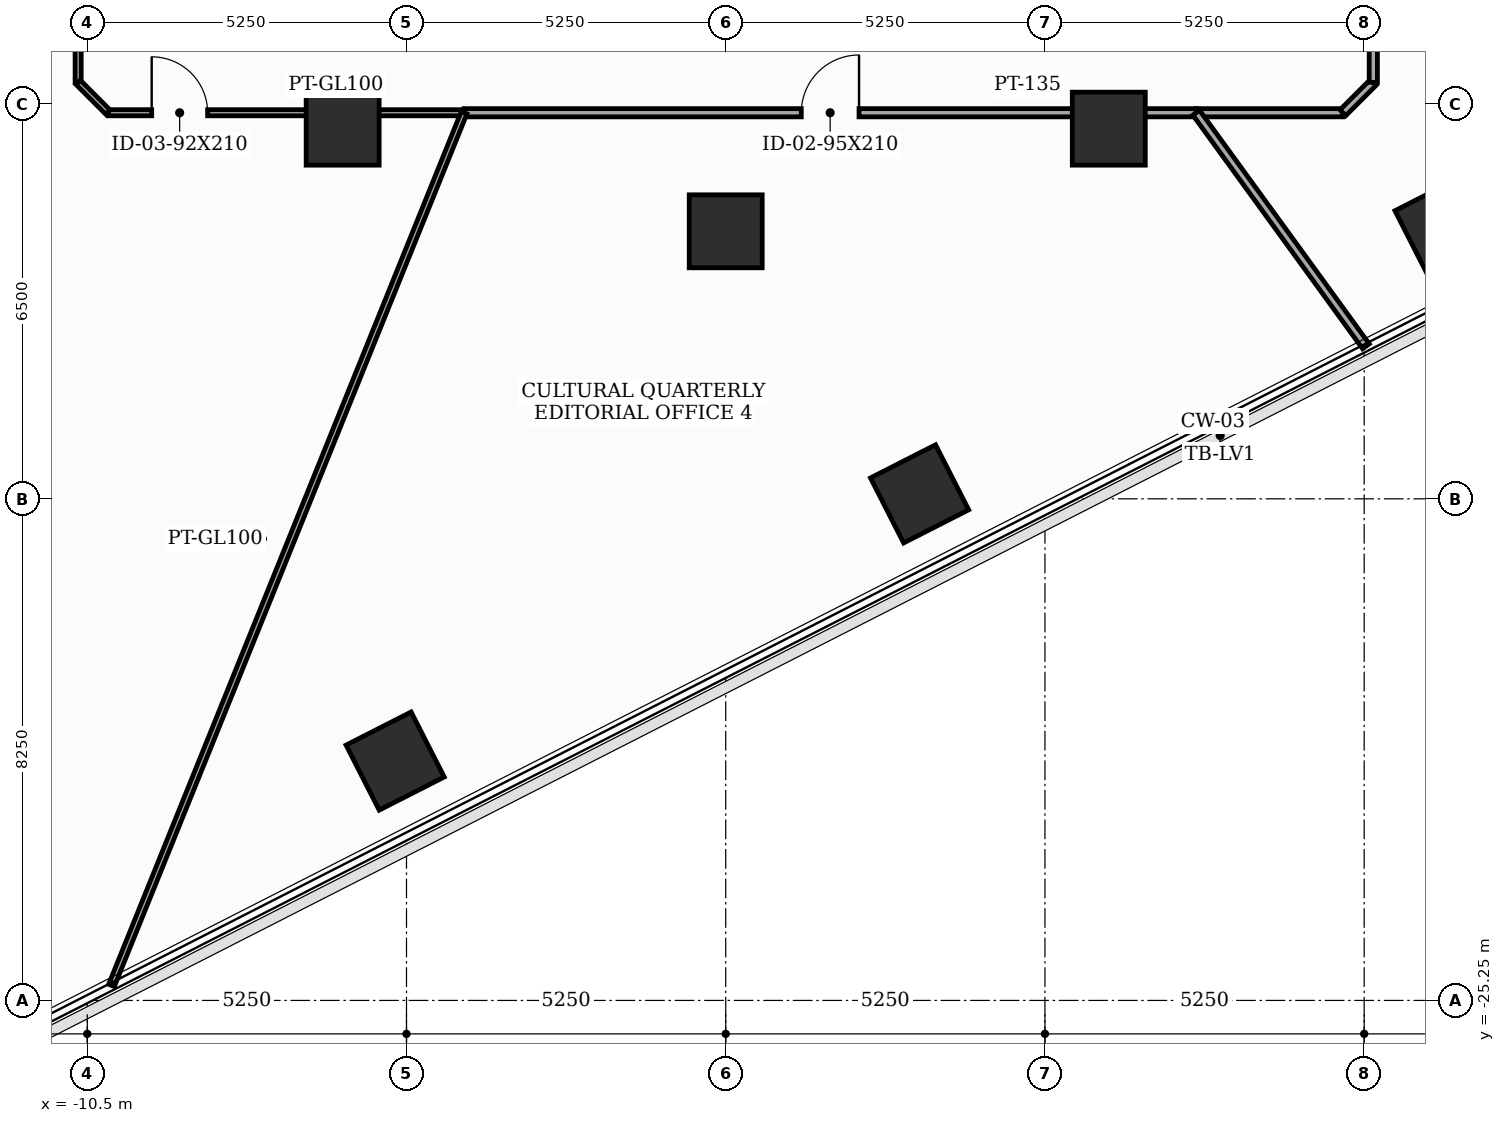
"""IFC4 building model, lengths in metres.
Left out: names, types, materials, properties, quantities, classifications, styles, units other than length and angle.
Written with IfcOpenShell. Run it as: python <this file> out.ifc"""

import sys

from ifc_helpers import new_model, si_unit, direction, frame, frame_2d, origin, origin_2d, place, context, subcontext, project, spatial, rectangle, extrude, element, fill, save


model = new_model("IFC4")
c1 = context("Model", 3, precision=1e-05, world=origin(), true_north=direction((0.0, 1.0)))
c2 = subcontext(c1, "Body", "Model", "MODEL_VIEW")
j1 = project(units=[si_unit("LENGTHUNIT", "METRE"), si_unit("PLANEANGLEUNIT", "RADIAN")], contexts=[c1])
p1 = place(None, origin())
s1 = spatial("IfcSite", under=j1, at=p1, CompositionType="ELEMENT")
p2 = place(p1, origin())
s2 = spatial("IfcBuilding", under=s1, at=p2, CompositionType="ELEMENT")
p3 = place(p2, frame((0.0, 0.0, 134.7)))
s3 = spatial("IfcBuildingStorey", under=s2, at=p3, CompositionType="ELEMENT", Elevation=134.7)
for number, where, z_axis, x_axis in (
    (1, (-6.3, -10.912, 0.0), (0.0, 0.0, 1.0), (1.0, 0.0, 0.0)),
    (2, (0.0, -12.6, 0.0), (0.0, 0.0, 1.0), (1.0, 0.0, 0.0)),
    (3, (6.3, -10.912, 0.0), (0.0, 0.0, 1.0), (1.0, 0.0, 0.0)),
    (4, (-5.437, -21.313, 0.0), (0.0, 0.0, 1.0), (0.891, 0.454, 0.0)),
    (5, (3.188, -16.918, 0.0), (0.0, 0.0, 1.0), (0.891, 0.454, 0.0)),
    (6, (11.813, -12.524, 0.0), (0.0, 0.0, 1.0), (0.891, 0.454, 0.0)),
):
    element("IfcColumn", number, at=place(p3, frame(where, z_axis=z_axis, x_axis=x_axis)), inside=s3, PredefinedType="COLUMN", context=c2, shape_type="SweptSolid", body=[
        extrude(rectangle(XDim=1.2, YDim=1.2, at=origin_2d()), origin(), (0.0, 0.0, 1.0), 3.7),
    ])
p4 = place(p3, frame((-10.65, -6.655, 0.0), z_axis=(0.0, 0.0, 1.0), x_axis=(0.0, -1.0, 0.0)))
e7 = element("IfcWall", 7, at=p4, inside=s3, PredefinedType="MOVABLE", context=c2, shape_type="SweptSolid", body=[
    extrude(rectangle(XDim=3.495, YDim=0.1, at=frame_2d((1.748, 0.0))), origin(), (0.0, 0.0, 1.0), 2.785),
])
p5 = place(p3, frame((-10.65, -10.15, 0.0), z_axis=(0.0, 0.0, 1.0), x_axis=(0.707106781187, -0.707106781187, 0.0)))
e8 = element("IfcWall", 8, at=p5, inside=s3, PredefinedType="MOVABLE", context=c2, shape_type="SweptSolid", body=[
    extrude(rectangle(XDim=0.707, YDim=0.1, at=frame_2d((0.354, 0.0))), origin(), (0.0, 0.0, 1.0), 3.5),
])
p6 = place(p3, frame((-10.15, -10.65, 0.0), z_axis=(0.0, 0.0, 1.0), x_axis=(1.0, 0.0, 0.0)))
e9 = element("IfcWall", 9, at=p6, inside=s3, PredefinedType="MOVABLE", context=c2, shape_type="SweptSolid", body=[
    extrude(rectangle(XDim=5.847, YDim=0.1, at=frame_2d((2.923, 0.0))), origin(), (0.0, 0.0, 1.0), 2.785),
])
p7 = place(p6, frame((0.709, 0.0, 0.0)))
e10 = element("IfcOpeningElement", 10, at=p7, cuts=e9, PredefinedType="OPENING", context=c2, shape_type="SweptSolid", body=[
    extrude(rectangle(XDim=0.92, YDim=2.1, at=frame_2d((0.46, 1.05))), frame((0.0, 0.06, 0.0), z_axis=(0.0, -1.0, 0.0), x_axis=(1.0, 0.0, 0.0)), (0.0, 0.0, 1.0), 0.12),
])
p8 = place(p3, frame((-4.303, -10.65, 0.0), z_axis=(0.0, 0.0, 1.0), x_axis=(1.0, 0.0, 0.0)))
e11 = element("IfcWall", 11, at=p8, inside=s3, PredefinedType="PARTITIONING", context=c2, shape_type="SweptSolid", body=[
    extrude(rectangle(XDim=12.041, YDim=0.135, at=frame_2d((6.021, 0.0))), origin(), (0.0, 0.0, 1.0), 2.785),
])
p9 = place(p8, frame((5.545, 0.0, 0.0)))
e12 = element("IfcOpeningElement", 12, at=p9, cuts=e11, PredefinedType="OPENING", context=c2, shape_type="SweptSolid", body=[
    extrude(rectangle(XDim=0.95, YDim=2.1, at=frame_2d((0.475, 1.05))), frame((0.0, 0.077, 0.0), z_axis=(0.0, -1.0, 0.0), x_axis=(1.0, 0.0, 0.0)), (0.0, 0.0, 1.0), 0.155),
])
p10 = place(p3, frame((7.738, -10.65, 0.0), z_axis=(0.0, 0.0, 1.0), x_axis=(1.0, 0.0, 0.0)))
e13 = element("IfcWall", 13, at=p10, inside=s3, PredefinedType="PARTITIONING", context=c2, shape_type="SweptSolid", body=[
    extrude(rectangle(XDim=2.412, YDim=0.135, at=frame_2d((1.206, 0.0))), origin(), (0.0, 0.0, 1.0), 3.5),
])
p11 = place(p3, frame((10.15, -10.65, 0.0), z_axis=(0.0, 0.0, 1.0), x_axis=(0.707106781187, 0.707106781187, 0.0)))
e14 = element("IfcWall", 14, at=p11, inside=s3, PredefinedType="PARTITIONING", context=c2, shape_type="SweptSolid", body=[
    extrude(rectangle(XDim=0.707, YDim=0.135, at=frame_2d((0.354, 0.0))), origin(), (0.0, 0.0, 1.0), 3.5),
])
p12 = place(p3, frame((10.65, -10.15, 0.0), z_axis=(0.0, 0.0, 1.0), x_axis=(0.0, 1.0, 0.0)))
e15 = element("IfcWall", 15, at=p12, inside=s3, PredefinedType="PARTITIONING", context=c2, shape_type="SweptSolid", body=[
    extrude(rectangle(XDim=15.813, YDim=0.135, at=frame_2d((7.906, 0.0))), origin(), (0.0, 0.0, 1.0), 2.785),
])
p13 = place(p12, frame((7.431, 0.0, 0.0)))
e16 = element("IfcOpeningElement", 16, at=p13, cuts=e15, PredefinedType="OPENING", context=c2, shape_type="SweptSolid", body=[
    extrude(rectangle(XDim=0.95, YDim=2.1, at=frame_2d((0.475, 1.05))), frame((0.0, 0.077, 0.0), z_axis=(0.0, -1.0, 0.0), x_axis=(1.0, 0.0, 0.0)), (0.0, 0.0, 1.0), 0.155),
])
p14 = place(p3, frame((-10.102, -25.003, 0.0), z_axis=(0.0, 0.0, 1.0), x_axis=(0.374591600556, 0.927189911935, 0.0)))
e17 = element("IfcWall", 17, at=p14, inside=s3, PredefinedType="MOVABLE", context=c2, shape_type="SweptSolid", body=[
    extrude(rectangle(XDim=15.48, YDim=0.1, at=frame_2d((7.74, 0.0))), origin(), (0.0, 0.0, 1.0), 2.785),
])
p15 = place(p3, frame((10.529, -14.491, 0.0), z_axis=(0.0, 0.0, 1.0), x_axis=(-0.58771300603, 0.809069479429, 0.0)))
e18 = element("IfcWall", 18, at=p15, inside=s3, PredefinedType="PARTITIONING", context=c2, shape_type="SweptSolid", body=[
    extrude(rectangle(XDim=4.748, YDim=0.135, at=frame_2d((2.374, 0.0))), origin(), (0.0, 0.0, 1.0), 2.885),
])
p16 = place(p7, origin())
e19 = element("IfcDoor", 19, at=p16, inside=s3, OperationType="SINGLE_SWING_LEFT", PredefinedType="DOOR", context=c2, shape_type="SweptSolid", body=[
    extrude(rectangle(XDim=0.92, YDim=2.1, at=frame_2d((0.46, 1.05))), frame((0.0, 0.025, 0.0), z_axis=(0.0, -1.0, 0.0), x_axis=(1.0, 0.0, 0.0)), (0.0, 0.0, 1.0), 0.05),
])
fill(e10, e19)
p17 = place(p9, origin())
e20 = element("IfcDoor", 20, at=p17, inside=s3, OperationType="SINGLE_SWING_RIGHT", PredefinedType="DOOR", context=c2, shape_type="SweptSolid", body=[
    extrude(rectangle(XDim=0.95, YDim=2.1, at=frame_2d((0.475, 1.05))), frame((0.0, 0.025, 0.0), z_axis=(0.0, -1.0, 0.0), x_axis=(1.0, 0.0, 0.0)), (0.0, 0.0, 1.0), 0.05),
])
fill(e12, e20)
save(model, sys.argv[1])
